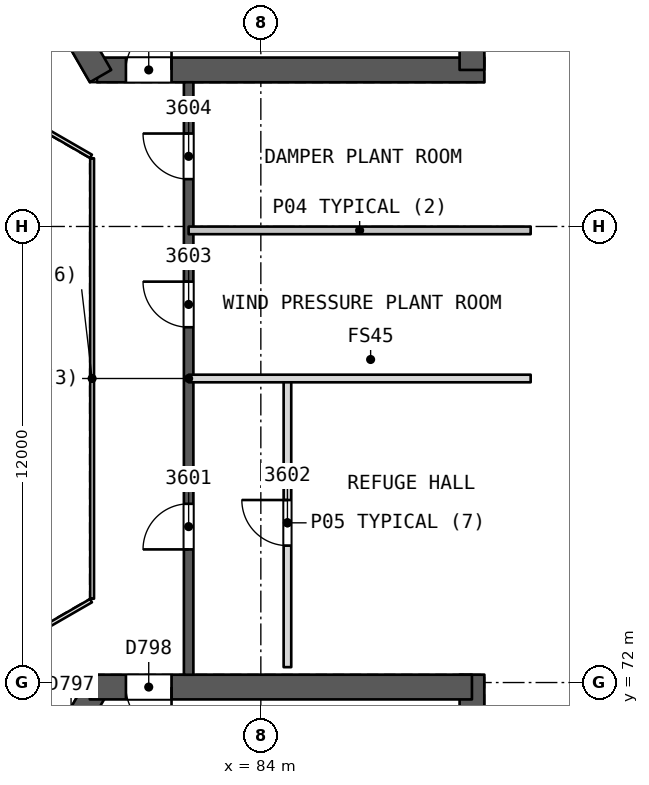
"""IFC4 building model, lengths in metres.
Left out: names, types, materials, properties, quantities, classifications, styles, units other than length and angle.
Written with IfcOpenShell. Run it as: python <this file> out.ifc"""

import sys

from ifc_helpers import new_model, si_unit, direction, frame, frame_2d, origin, place, context, subcontext, project, spatial, rectangle, extrude, element, fill, save


model = new_model("IFC4")
c1 = context("Model", 3, precision=1e-05, world=origin(), true_north=direction((0.0, 1.0)))
c2 = subcontext(c1, "Body", "Model", "MODEL_VIEW")
j1 = project(units=[si_unit("LENGTHUNIT", "METRE"), si_unit("PLANEANGLEUNIT", "RADIAN")], contexts=[c1])
p1 = place(None, origin())
s1 = spatial("IfcSite", under=j1, at=p1, CompositionType="ELEMENT")
p2 = place(p1, origin())
s2 = spatial("IfcBuilding", under=s1, at=p2, CompositionType="ELEMENT")
p3 = place(p2, frame((0.0, 0.0, 147.5)))
s3 = spatial("IfcBuildingStorey", under=s2, at=p3, CompositionType="ELEMENT", Elevation=147.5)
p4 = place(p3, frame((79.688, 88.119, 0.0), z_axis=(0.0, 0.0, 1.0), x_axis=(1.0, 0.0, 0.0)))
e1 = element("IfcWall", 1, at=p4, inside=s3, PredefinedType="SHEAR", context=c2, shape_type="SweptSolid", body=[
    extrude(rectangle(XDim=10.192, YDim=0.65, at=frame_2d((5.096, 0.0))), origin(), (0.0, 0.0, 1.0), 8.8),
])
p5 = place(p4, frame((0.762, 0.0, 0.0)))
e2 = element("IfcOpeningElement", 2, at=p5, cuts=e1, PredefinedType="OPENING", context=c2, shape_type="SweptSolid", body=[
    extrude(rectangle(XDim=1.2, YDim=2.1, at=frame_2d((0.6, 1.05))), frame((0.0, 0.335, 0.0), z_axis=(0.0, -1.0, 0.0), x_axis=(1.0, 0.0, 0.0)), (0.0, 0.0, 1.0), 0.671),
])
p6 = place(p3, frame((89.555, 88.119, 0.0), z_axis=(0.0, 0.0, 1.0), x_axis=(0.0, 1.0, 0.0)))
e3 = element("IfcWall", 3, at=p6, inside=s3, PredefinedType="SHEAR", context=c2, shape_type="SweptSolid", body=[
    extrude(rectangle(XDim=14.009, YDim=0.65, at=frame_2d((7.004, 0.0))), origin(), (0.0, 0.0, 1.0), 8.8),
])
p7 = place(p3, frame((74.754, 96.665, 0.0), z_axis=(0.0, 0.0, 1.0), x_axis=(0.500011799426, -0.866018591275, 0.0)))
e4 = element("IfcWall", 4, at=p7, inside=s3, PredefinedType="SHEAR", context=c2, shape_type="SweptSolid", body=[
    extrude(rectangle(XDim=10.055, YDim=0.65, at=frame_2d((5.027, 0.0))), origin(), (0.0, 0.0, 1.0), 8.8),
])
p8 = place(p7, frame((7.905, 0.0, 0.0)))
e5 = element("IfcOpeningElement", 5, at=p8, cuts=e4, PredefinedType="OPENING", context=c2, shape_type="SweptSolid", body=[
    extrude(rectangle(XDim=1.2, YDim=2.1, at=frame_2d((0.6, 1.05))), frame((0.0, 0.335, 0.0), z_axis=(0.0, -1.0, 0.0), x_axis=(1.0, 0.0, 0.0)), (0.0, 0.0, 1.0), 0.671),
])
p9 = place(p3, frame((79.688, 71.881, 0.0), z_axis=(0.0, 0.0, 1.0), x_axis=(-0.49999822179, -0.866026430432, 0.0)))
e6 = element("IfcWall", 6, at=p9, inside=s3, PredefinedType="SHEAR", context=c2, shape_type="SweptSolid", body=[
    extrude(rectangle(XDim=10.192, YDim=0.65, at=frame_2d((5.096, 0.0))), origin(), (0.0, 0.0, 1.0), 8.8),
])
p10 = place(p9, frame((0.762, 0.0, 0.0)))
e7 = element("IfcOpeningElement", 7, at=p10, cuts=e6, PredefinedType="OPENING", context=c2, shape_type="SweptSolid", body=[
    extrude(rectangle(XDim=1.2, YDim=2.1, at=frame_2d((0.6, 1.05))), frame((0.0, 0.335, 0.0), z_axis=(0.0, -1.0, 0.0), x_axis=(1.0, 0.0, 0.0)), (0.0, 0.0, 1.0), 0.671),
])
p11 = place(p3, frame((89.555, 58.06, 0.0), z_axis=(0.0, 0.0, 1.0), x_axis=(0.0, 1.0, 0.0)))
e8 = element("IfcWall", 8, at=p11, inside=s3, PredefinedType="SHEAR", context=c2, shape_type="SweptSolid", body=[
    extrude(rectangle(XDim=14.146, YDim=0.65, at=frame_2d((7.073, 0.0))), origin(), (0.0, 0.0, 1.0), 8.8),
])
p12 = place(p3, frame((89.555, 71.881, 0.0), z_axis=(0.0, 0.0, 1.0), x_axis=(-1.0, 0.0, 0.0)))
e9 = element("IfcWall", 9, at=p12, inside=s3, PredefinedType="SHEAR", context=c2, shape_type="SweptSolid", body=[
    extrude(rectangle(XDim=10.055, YDim=0.65, at=frame_2d((5.027, 0.0))), origin(), (0.0, 0.0, 1.0), 8.8),
])
p13 = place(p12, frame((7.905, 0.0, 0.0)))
e10 = element("IfcOpeningElement", 10, at=p13, cuts=e9, PredefinedType="OPENING", context=c2, shape_type="SweptSolid", body=[
    extrude(rectangle(XDim=1.2, YDim=2.1, at=frame_2d((0.6, 1.05))), frame((0.0, 0.335, 0.0), z_axis=(0.0, -1.0, 0.0), x_axis=(1.0, 0.0, 0.0)), (0.0, 0.0, 1.0), 0.671),
])
p14 = place(p3, frame((82.1, 72.206, 0.0), z_axis=(0.0, 0.0, 1.0), x_axis=(0.0, 1.0, 0.0)))
e11 = element("IfcWall", 11, at=p14, inside=s3, PredefinedType="SHEAR", context=c2, shape_type="SweptSolid", body=[
    extrude(rectangle(XDim=15.588, YDim=0.25, at=frame_2d((7.794, 0.0))), origin(), (0.0, 0.0, 1.0), 8.35),
])
p15 = place(p14, frame((3.297, 0.0, 0.0)))
e12 = element("IfcOpeningElement", 12, at=p15, cuts=e11, PredefinedType="OPENING", context=c2, shape_type="SweptSolid", body=[
    extrude(rectangle(XDim=1.2, YDim=2.4, at=frame_2d((0.6, 1.2))), frame((0.0, 0.135, 0.0), z_axis=(0.0, -1.0, 0.0), x_axis=(1.0, 0.0, 0.0)), (0.0, 0.0, 1.0), 0.271),
])
p16 = place(p14, frame((9.143, 0.0, 0.0)))
e13 = element("IfcOpeningElement", 13, at=p16, cuts=e11, PredefinedType="OPENING", context=c2, shape_type="SweptSolid", body=[
    extrude(rectangle(XDim=1.2, YDim=2.4, at=frame_2d((0.6, 1.2))), frame((0.0, 0.135, 0.0), z_axis=(0.0, -1.0, 0.0), x_axis=(1.0, 0.0, 0.0)), (0.0, 0.0, 1.0), 0.271),
])
p17 = place(p14, frame((13.04, 0.0, 0.0)))
e14 = element("IfcOpeningElement", 14, at=p17, cuts=e11, PredefinedType="OPENING", context=c2, shape_type="SweptSolid", body=[
    extrude(rectangle(XDim=1.2, YDim=2.4, at=frame_2d((0.6, 1.2))), frame((0.0, 0.135, 0.0), z_axis=(0.0, -1.0, 0.0), x_axis=(1.0, 0.0, 0.0)), (0.0, 0.0, 1.0), 0.271),
])
p18 = place(p3, frame((84.7, 72.405, 0.0), z_axis=(0.0, 0.0, 1.0), x_axis=(0.0, 1.0, 0.0)))
e15 = element("IfcWall", 15, at=p18, inside=s3, PredefinedType="PARTITIONING", context=c2, shape_type="SweptSolid", body=[
    extrude(rectangle(XDim=7.595, YDim=0.2, at=frame_2d((3.798, 0.0))), origin(), (0.0, 0.0, 1.0), 8.35),
])
p19 = place(p18, frame((3.198, 0.0, 0.0)))
e16 = element("IfcOpeningElement", 16, at=p19, cuts=e15, PredefinedType="OPENING", context=c2, shape_type="SweptSolid", body=[
    extrude(rectangle(XDim=1.2, YDim=2.4, at=frame_2d((0.6, 1.2))), frame((0.0, 0.11, 0.0), z_axis=(0.0, -1.0, 0.0), x_axis=(1.0, 0.0, 0.0)), (0.0, 0.0, 1.0), 0.221),
])
for number, where, z_axis, x_axis in (
    (17, (91.1, 80.0, 0.0), (0.0, 0.0, 1.0), (-1.0, 0.0, 0.0)),
    (18, (91.1, 83.897, 0.0), (0.0, 0.0, 1.0), (-1.0, 0.0, 0.0)),
):
    element("IfcWall", number, at=place(p3, frame(where, z_axis=z_axis, x_axis=x_axis)), inside=s3, PredefinedType="PARTITIONING", context=c2, shape_type="SweptSolid", body=[
        extrude(rectangle(XDim=9.0, YDim=0.2, at=frame_2d((4.5, 0.0))), origin(), (0.0, 0.0, 1.0), 8.35),
    ])
p20 = place(p3, frame((79.56, 74.206, 0.0), z_axis=(0.0, 0.0, 1.0), x_axis=(0.0, 1.0, 0.0)))
e19 = element("IfcWall", 19, at=p20, inside=s3, PredefinedType="PARTITIONING", context=c2, shape_type="SweptSolid", body=[
    extrude(rectangle(XDim=11.588, YDim=0.1, at=frame_2d((5.794, 0.0))), origin(), (0.0, 0.0, 1.0), 8.35),
])
for number, where, z_axis, x_axis in (
    (20, (79.53, 85.846, 0.0), (0.0, 0.0, 1.0), (-0.866, 0.5, 0.0)),
    (21, (77.798, 73.154, 0.0), (0.0, 0.0, 1.0), (0.866, 0.5, 0.0)),
):
    element("IfcWall", number, at=place(p3, frame(where, z_axis=z_axis, x_axis=x_axis)), inside=s3, PredefinedType="PARTITIONING", context=c2, shape_type="SweptSolid", body=[
        extrude(rectangle(XDim=2.0, YDim=0.1, at=frame_2d((1.0, 0.0))), origin(), (0.0, 0.0, 1.0), 8.35),
    ])
p21 = place(p15, origin())
e22 = element("IfcDoor", 22, at=p21, inside=s3, OperationType="SINGLE_SWING_LEFT", PredefinedType="NOTDEFINED", context=c2, shape_type="SweptSolid", body=[
    extrude(rectangle(XDim=1.2, YDim=2.4, at=frame_2d((0.6, 1.2))), frame((0.0, 0.025, 0.0), z_axis=(0.0, -1.0, 0.0), x_axis=(1.0, 0.0, 0.0)), (0.0, 0.0, 1.0), 0.05),
])
fill(e12, e22)
p22 = place(p19, origin())
e23 = element("IfcDoor", 23, at=p22, inside=s3, OperationType="SINGLE_SWING_RIGHT", PredefinedType="NOTDEFINED", context=c2, shape_type="SweptSolid", body=[
    extrude(rectangle(XDim=1.2, YDim=2.4, at=frame_2d((0.6, 1.2))), frame((0.0, 0.025, 0.0), z_axis=(0.0, -1.0, 0.0), x_axis=(1.0, 0.0, 0.0)), (0.0, 0.0, 1.0), 0.05),
])
fill(e16, e23)
p23 = place(p16, origin())
e24 = element("IfcDoor", 24, at=p23, inside=s3, OperationType="SINGLE_SWING_RIGHT", PredefinedType="NOTDEFINED", context=c2, shape_type="SweptSolid", body=[
    extrude(rectangle(XDim=1.2, YDim=2.4, at=frame_2d((0.6, 1.2))), frame((0.0, 0.025, 0.0), z_axis=(0.0, -1.0, 0.0), x_axis=(1.0, 0.0, 0.0)), (0.0, 0.0, 1.0), 0.05),
])
fill(e13, e24)
p24 = place(p17, origin())
e25 = element("IfcDoor", 25, at=p24, inside=s3, OperationType="SINGLE_SWING_RIGHT", PredefinedType="NOTDEFINED", context=c2, shape_type="SweptSolid", body=[
    extrude(rectangle(XDim=1.2, YDim=2.4, at=frame_2d((0.6, 1.2))), frame((0.0, 0.025, 0.0), z_axis=(0.0, -1.0, 0.0), x_axis=(1.0, 0.0, 0.0)), (0.0, 0.0, 1.0), 0.05),
])
fill(e14, e25)
p25 = place(p5, origin())
e26 = element("IfcDoor", 26, at=p25, inside=s3, OperationType="SINGLE_SWING_RIGHT", PredefinedType="NOTDEFINED", context=c2, shape_type="SweptSolid", body=[
    extrude(rectangle(XDim=1.2, YDim=2.1, at=frame_2d((0.6, 1.05))), frame((0.0, 0.025, 0.0), z_axis=(0.0, -1.0, 0.0), x_axis=(1.0, 0.0, 0.0)), (0.0, 0.0, 1.0), 0.05),
])
fill(e2, e26)
p26 = place(p13, origin())
e27 = element("IfcDoor", 27, at=p26, inside=s3, OperationType="SINGLE_SWING_LEFT", PredefinedType="NOTDEFINED", context=c2, shape_type="SweptSolid", body=[
    extrude(rectangle(XDim=1.2, YDim=2.1, at=frame_2d((0.6, 1.05))), frame((0.0, 0.025, 0.0), z_axis=(0.0, -1.0, 0.0), x_axis=(1.0, 0.0, 0.0)), (0.0, 0.0, 1.0), 0.05),
])
fill(e10, e27)
save(model, sys.argv[1])
